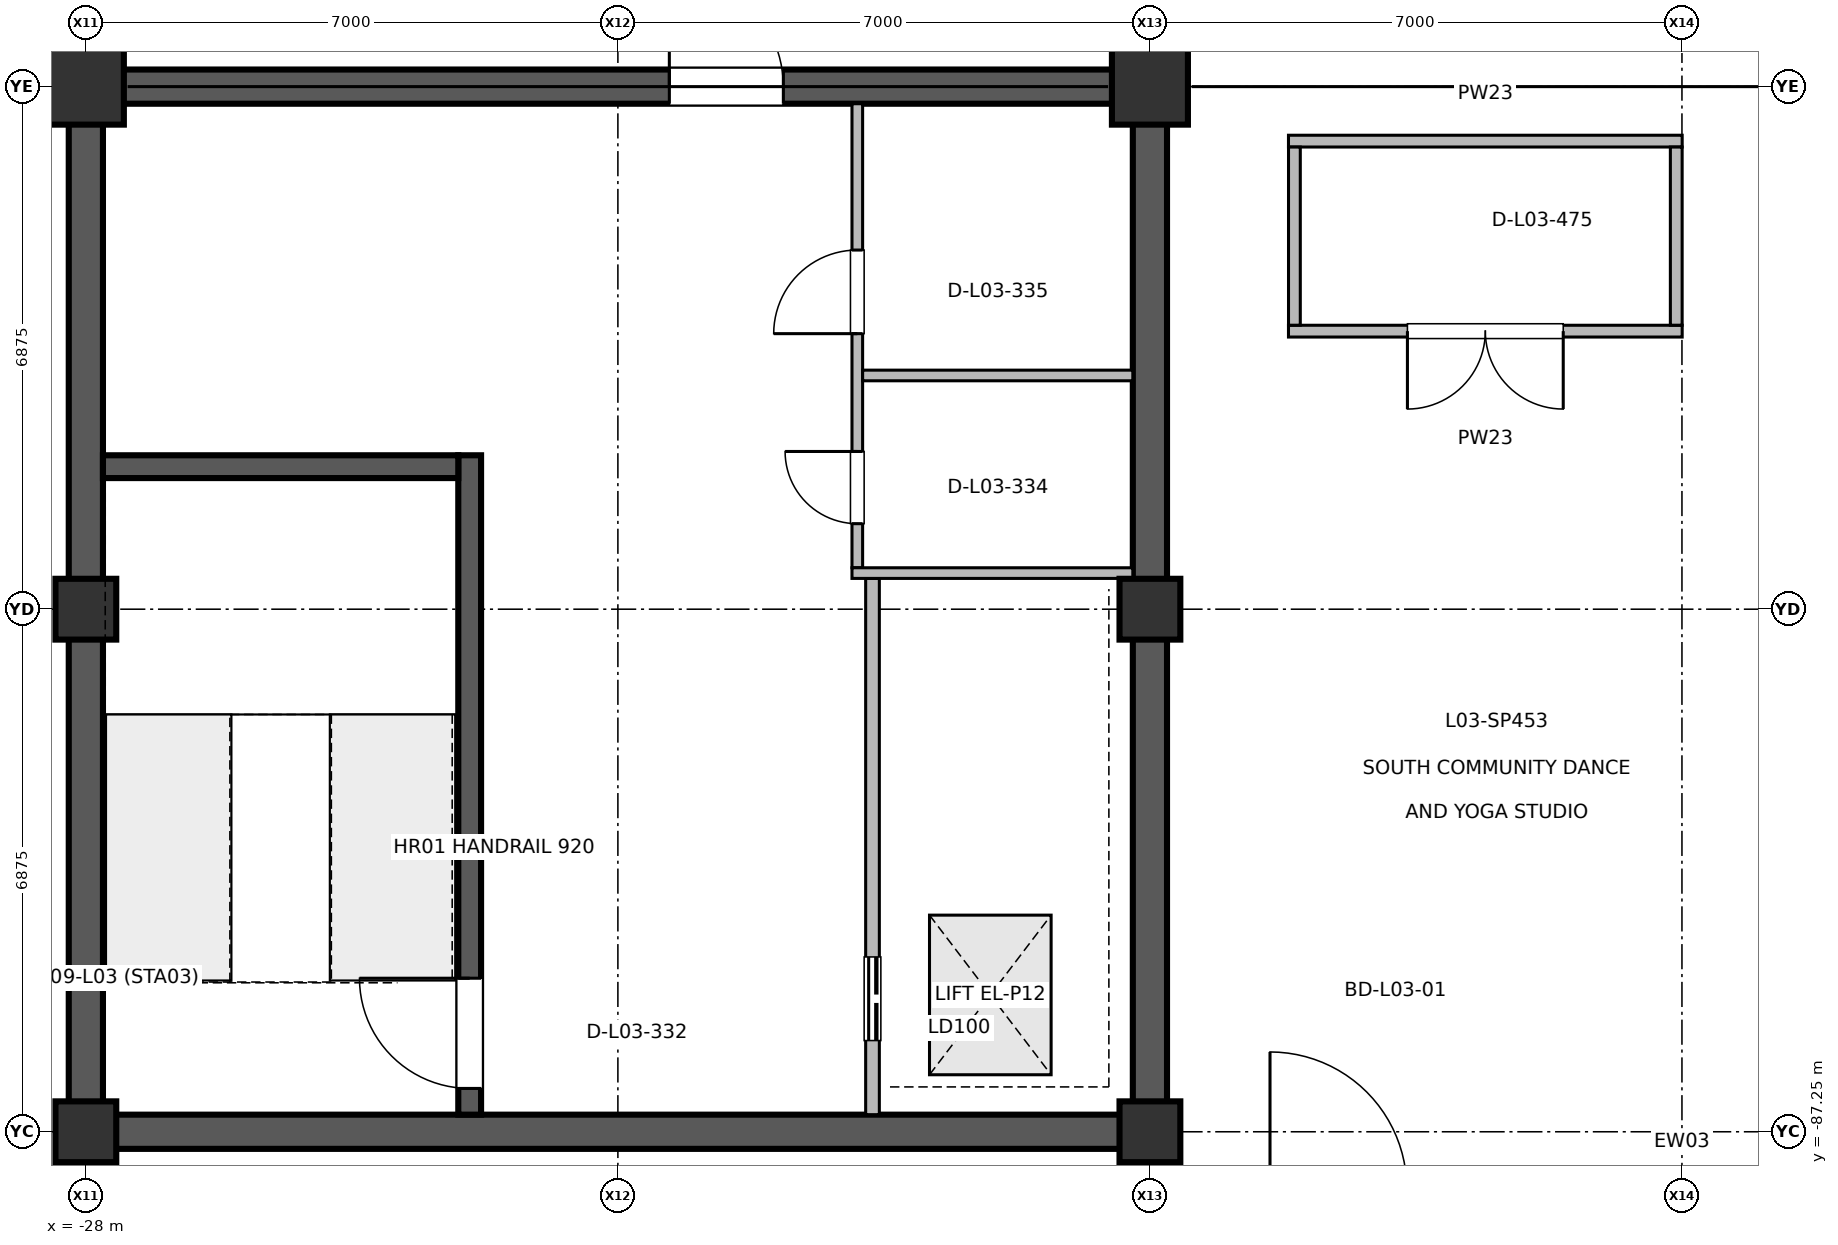
"""IFC4 building model, lengths in metres.
Left out: names, types, materials, properties, quantities, classifications, styles, units other than length and angle.
Written with IfcOpenShell. Run it as: python <this file> out.ifc"""

import sys

from ifc_helpers import new_model, si_unit, direction, frame, frame_2d, origin, origin_2d, place, context, subcontext, project, spatial, rectangle, extrude, element, fill, save


model = new_model("IFC4")
c1 = context("Model", 3, precision=1e-05, world=origin(), true_north=direction((0.0, 1.0)))
c2 = subcontext(c1, "Body", "Model", "MODEL_VIEW")
j1 = project(units=[si_unit("LENGTHUNIT", "METRE"), si_unit("PLANEANGLEUNIT", "RADIAN")], contexts=[c1])
p1 = place(None, origin())
s1 = spatial("IfcSite", under=j1, at=p1, CompositionType="ELEMENT")
p2 = place(p1, origin())
s2 = spatial("IfcBuilding", under=s1, at=p2, CompositionType="ELEMENT")
p3 = place(p2, frame((0.0, 0.0, 11.4)))
s3 = spatial("IfcBuildingStorey", under=s2, at=p3, CompositionType="ELEMENT", Elevation=11.4)
for number, where, z_axis, x_axis in (
    (1, (-28.0, -87.25, 0.0), (0.0, 0.0, 1.0), (1.0, 0.0, 0.0)),
    (2, (-28.0, -80.375, 0.0), (0.0, 0.0, 1.0), (1.0, 0.0, 0.0)),
):
    element("IfcColumn", number, at=place(p3, frame(where, z_axis=z_axis, x_axis=x_axis)), inside=s3, PredefinedType="COLUMN", context=c2, shape_type="SweptSolid", body=[
        extrude(rectangle(XDim=0.8, YDim=0.8, at=origin_2d()), origin(), (0.0, 0.0, 1.0), 4.798),
    ])
p4 = place(p3, frame((-28.0, -73.5, 0.0), z_axis=(0.0, 0.0, 1.0), x_axis=(1.0, 0.0, 0.0)))
e3 = element("IfcColumn", 3, at=p4, inside=s3, PredefinedType="COLUMN", context=c2, shape_type="SweptSolid", body=[
    extrude(rectangle(XDim=1.0, YDim=1.0, at=origin_2d()), origin(), (0.0, 0.0, 1.0), 4.798),
])
for number, where, z_axis, x_axis in (
    (4, (-14.0, -87.25, 0.0), (0.0, 0.0, 1.0), (1.0, 0.0, 0.0)),
    (5, (-14.0, -80.375, 0.0), (0.0, 0.0, 1.0), (1.0, 0.0, 0.0)),
):
    element("IfcColumn", number, at=place(p3, frame(where, z_axis=z_axis, x_axis=x_axis)), inside=s3, PredefinedType="COLUMN", context=c2, shape_type="SweptSolid", body=[
        extrude(rectangle(XDim=0.8, YDim=0.8, at=origin_2d()), origin(), (0.0, 0.0, 1.0), 4.798),
    ])
p5 = place(p3, frame((-14.0, -73.5, 0.0), z_axis=(0.0, 0.0, 1.0), x_axis=(1.0, 0.0, 0.0)))
e6 = element("IfcColumn", 6, at=p5, inside=s3, PredefinedType="COLUMN", context=c2, shape_type="SweptSolid", body=[
    extrude(rectangle(XDim=1.0, YDim=1.0, at=origin_2d()), origin(), (0.0, 0.0, 1.0), 4.798),
])
for number, where, z_axis, x_axis in (
    (7, (-28.0, -87.025, 0.0), (0.0, 0.0, 1.0), (0.0, 1.0, 0.0)),
    (8, (-14.0, -87.025, 0.0), (0.0, 0.0, 1.0), (0.0, 1.0, 0.0)),
):
    element("IfcWall", number, at=place(p3, frame(where, z_axis=z_axis, x_axis=x_axis)), inside=s3, PredefinedType="SHEAR", context=c2, shape_type="SweptSolid", body=[
        extrude(rectangle(XDim=13.3, YDim=0.45, at=frame_2d((6.65, 0.0))), origin(), (0.0, 0.0, 1.0), 4.62),
    ])
p6 = place(p3, frame((-27.775, -87.25, 0.0), z_axis=(0.0, 0.0, 1.0), x_axis=(1.0, 0.0, 0.0)))
e9 = element("IfcWall", 9, at=p6, inside=s3, PredefinedType="SHEAR", context=c2, shape_type="SweptSolid", body=[
    extrude(rectangle(XDim=13.55, YDim=0.45, at=frame_2d((6.775, 0.0))), origin(), (0.0, 0.0, 1.0), 4.62),
])
p7 = place(p3, frame((-27.775, -73.5, 0.0), z_axis=(0.0, 0.0, 1.0), x_axis=(1.0, 0.0, 0.0)))
e10 = element("IfcWall", 10, at=p7, inside=s3, PredefinedType="SHEAR", context=c2, shape_type="SweptSolid", body=[
    extrude(rectangle(XDim=13.55, YDim=0.45, at=frame_2d((6.775, 0.0))), origin(), (0.0, 0.0, 1.0), 4.62),
])
p8 = place(p7, frame((7.452, 0.0, 0.0)))
e11 = element("IfcOpeningElement", 11, at=p8, cuts=e10, PredefinedType="OPENING", context=c2, shape_type="SweptSolid", body=[
    extrude(rectangle(XDim=1.5, YDim=2.2, at=frame_2d((0.75, 1.1))), frame((0.0, 0.235, 0.0), z_axis=(0.0, -1.0, 0.0), x_axis=(1.0, 0.0, 0.0)), (0.0, 0.0, 1.0), 0.47),
])
p9 = place(p3, frame((-22.95, -87.025, 0.0), z_axis=(0.0, 0.0, 1.0), x_axis=(0.0, 1.0, 0.0)))
e12 = element("IfcWall", 12, at=p9, inside=s3, PredefinedType="SHEAR", context=c2, shape_type="SweptSolid", body=[
    extrude(rectangle(XDim=8.675, YDim=0.3, at=frame_2d((4.337, 0.0))), origin(), (0.0, 0.0, 1.0), 4.62),
])
p10 = place(p9, frame((0.345, 0.0, 0.0)))
e13 = element("IfcOpeningElement", 13, at=p10, cuts=e12, PredefinedType="OPENING", context=c2, shape_type="SweptSolid", body=[
    extrude(rectangle(XDim=1.45, YDim=2.2, at=frame_2d((0.725, 1.1))), frame((0.0, 0.16, 0.0), z_axis=(0.0, -1.0, 0.0), x_axis=(1.0, 0.0, 0.0)), (0.0, 0.0, 1.0), 0.32),
])
p11 = place(p3, frame((-17.65, -87.025, 0.0), z_axis=(0.0, 0.0, 1.0), x_axis=(0.0, 1.0, 0.0)))
e14 = element("IfcWall", 14, at=p11, inside=s3, PredefinedType="PARTITIONING", context=c2, shape_type="SweptSolid", body=[
    extrude(rectangle(XDim=7.055, YDim=0.18, at=frame_2d((3.527, 0.0))), origin(), (0.0, 0.0, 1.0), 3.82),
])
p12 = place(p11, frame((0.975, 0.0, 0.0)))
e15 = element("IfcOpeningElement", 15, at=p12, cuts=e14, PredefinedType="OPENING", context=c2, shape_type="SweptSolid", body=[
    extrude(rectangle(XDim=1.1, YDim=2.2, at=frame_2d((0.55, 1.1))), frame((0.0, 0.1, 0.0), z_axis=(0.0, -1.0, 0.0), x_axis=(1.0, 0.0, 0.0)), (0.0, 0.0, 1.0), 0.2),
])
p13 = place(p3, frame((-17.85, -79.83, 0.0), z_axis=(0.0, 0.0, 1.0), x_axis=(0.0, 1.0, 0.0)))
e16 = element("IfcWall", 16, at=p13, inside=s3, PredefinedType="PARTITIONING", context=c2, shape_type="SweptSolid", body=[
    extrude(rectangle(XDim=6.105, YDim=0.14, at=frame_2d((3.052, 0.0))), origin(), (0.0, 0.0, 1.0), 3.82),
])
p14 = place(p13, frame((0.58, 0.0, 0.0)))
e17 = element("IfcOpeningElement", 17, at=p14, cuts=e16, PredefinedType="OPENING", context=c2, shape_type="SweptSolid", body=[
    extrude(rectangle(XDim=0.95, YDim=2.15, at=frame_2d((0.475, 1.075))), frame((0.0, 0.08, 0.0), z_axis=(0.0, -1.0, 0.0), x_axis=(1.0, 0.0, 0.0)), (0.0, 0.0, 1.0), 0.16),
])
p15 = place(p13, frame((3.08, 0.0, 0.0)))
e18 = element("IfcOpeningElement", 18, at=p15, cuts=e16, PredefinedType="OPENING", context=c2, shape_type="SweptSolid", body=[
    extrude(rectangle(XDim=1.1, YDim=2.15, at=frame_2d((0.55, 1.075))), frame((0.0, 0.08, 0.0), z_axis=(0.0, -1.0, 0.0), x_axis=(1.0, 0.0, 0.0)), (0.0, 0.0, 1.0), 0.16),
])
p16 = place(p3, frame((-6.997, -76.717, 0.0), z_axis=(0.0, 0.0, 1.0), x_axis=(-1.0, 0.0, 0.0)))
e19 = element("IfcWall", 19, at=p16, inside=s3, PredefinedType="PARTITIONING", context=c2, shape_type="SweptSolid", body=[
    extrude(rectangle(XDim=5.18, YDim=0.155, at=frame_2d((2.59, 0.0))), origin(), (0.0, 0.0, 1.0), 3.82),
])
p17 = place(p16, frame((1.565, 0.0, 0.0)))
e20 = element("IfcOpeningElement", 20, at=p17, cuts=e19, PredefinedType="OPENING", context=c2, shape_type="SweptSolid", body=[
    extrude(rectangle(XDim=2.05, YDim=2.4, at=frame_2d((1.025, 1.2))), frame((0.0, 0.087, 0.0), z_axis=(0.0, -1.0, 0.0), x_axis=(1.0, 0.0, 0.0)), (0.0, 0.0, 1.0), 0.175),
])
p18 = place(p3, frame((-17.92, -79.9, 0.0), z_axis=(0.0, 0.0, 1.0), x_axis=(1.0, 0.0, 0.0)))
e21 = element("IfcWall", 21, at=p18, inside=s3, PredefinedType="PARTITIONING", context=c2, shape_type="SweptSolid", body=[
    extrude(rectangle(XDim=3.695, YDim=0.14, at=frame_2d((1.847, 0.0))), origin(), (0.0, 0.0, 1.0), 3.82),
])
p19 = place(p3, frame((-17.78, -77.3, 0.0), z_axis=(0.0, 0.0, 1.0), x_axis=(1.0, 0.0, 0.0)))
e22 = element("IfcWall", 22, at=p19, inside=s3, PredefinedType="PARTITIONING", context=c2, shape_type="SweptSolid", body=[
    extrude(rectangle(XDim=3.555, YDim=0.14, at=frame_2d((1.777, 0.0))), origin(), (0.0, 0.0, 1.0), 3.82),
])
p20 = place(p3, frame((-12.177, -74.217, 0.0), z_axis=(0.0, 0.0, 1.0), x_axis=(1.0, 0.0, 0.0)))
e23 = element("IfcWall", 23, at=p20, inside=s3, PredefinedType="PARTITIONING", context=c2, shape_type="SweptSolid", body=[
    extrude(rectangle(XDim=5.18, YDim=0.155, at=frame_2d((2.59, 0.0))), origin(), (0.0, 0.0, 1.0), 3.82),
])
for number, where, z_axis, x_axis in (
    (24, (-12.099, -76.639, 0.0), (0.0, 0.0, 1.0), (0.0, 1.0, 0.0)),
    (25, (-7.075, -76.639, 0.0), (0.0, 0.0, 1.0), (0.0, 1.0, 0.0)),
):
    element("IfcWall", number, at=place(p3, frame(where, z_axis=z_axis, x_axis=x_axis)), inside=s3, PredefinedType="PARTITIONING", context=c2, shape_type="SweptSolid", body=[
        extrude(rectangle(XDim=2.344, YDim=0.155, at=frame_2d((1.172, 0.0))), origin(), (0.0, 0.0, 1.0), 3.82),
    ])
p21 = place(p3, frame((-27.775, -78.5, 0.0), z_axis=(0.0, 0.0, 1.0), x_axis=(1.0, 0.0, 0.0)))
e26 = element("IfcWall", 26, at=p21, inside=s3, PredefinedType="SHEAR", context=c2, shape_type="SweptSolid", body=[
    extrude(rectangle(XDim=4.675, YDim=0.3, at=frame_2d((2.337, 0.0))), origin(), (0.0, 0.0, 1.0), 4.62),
])
p22 = place(p8, origin())
e27 = element("IfcDoor", 27, at=p22, inside=s3, OperationType="SINGLE_SWING_LEFT", PredefinedType="DOOR", context=c2, shape_type="SweptSolid", body=[
    extrude(rectangle(XDim=1.5, YDim=2.2, at=frame_2d((0.75, 1.1))), frame((0.0, 0.025, 0.0), z_axis=(0.0, -1.0, 0.0), x_axis=(1.0, 0.0, 0.0)), (0.0, 0.0, 1.0), 0.05),
])
fill(e11, e27)
p23 = place(p10, origin())
e28 = element("IfcDoor", 28, at=p23, inside=s3, OperationType="SINGLE_SWING_RIGHT", PredefinedType="DOOR", context=c2, shape_type="SweptSolid", body=[
    extrude(rectangle(XDim=1.45, YDim=2.2, at=frame_2d((0.725, 1.1))), frame((0.0, 0.025, 0.0), z_axis=(0.0, -1.0, 0.0), x_axis=(1.0, 0.0, 0.0)), (0.0, 0.0, 1.0), 0.05),
])
fill(e13, e28)
p24 = place(p12, origin())
e29 = element("IfcDoor", 29, at=p24, inside=s3, OperationType="DOUBLE_DOOR_SLIDING", PredefinedType="DOOR", context=c2, shape_type="SweptSolid", body=[
    extrude(rectangle(XDim=1.1, YDim=2.2, at=frame_2d((0.55, 1.1))), frame((0.0, 0.025, 0.0), z_axis=(0.0, -1.0, 0.0), x_axis=(1.0, 0.0, 0.0)), (0.0, 0.0, 1.0), 0.05),
])
fill(e15, e29)
p25 = place(p14, origin())
e30 = element("IfcDoor", 30, at=p25, inside=s3, OperationType="SINGLE_SWING_RIGHT", PredefinedType="DOOR", context=c2, shape_type="SweptSolid", body=[
    extrude(rectangle(XDim=0.95, YDim=2.15, at=frame_2d((0.475, 1.075))), frame((0.0, 0.025, 0.0), z_axis=(0.0, -1.0, 0.0), x_axis=(1.0, 0.0, 0.0)), (0.0, 0.0, 1.0), 0.05),
])
fill(e17, e30)
p26 = place(p15, origin())
e31 = element("IfcDoor", 31, at=p26, inside=s3, OperationType="SINGLE_SWING_LEFT", PredefinedType="DOOR", context=c2, shape_type="SweptSolid", body=[
    extrude(rectangle(XDim=1.1, YDim=2.15, at=frame_2d((0.55, 1.075))), frame((0.0, 0.025, 0.0), z_axis=(0.0, -1.0, 0.0), x_axis=(1.0, 0.0, 0.0)), (0.0, 0.0, 1.0), 0.05),
])
fill(e18, e31)
p27 = place(p17, origin())
e32 = element("IfcDoor", 32, at=p27, inside=s3, OperationType="DOUBLE_DOOR_SINGLE_SWING", PredefinedType="DOOR", context=c2, shape_type="SweptSolid", body=[
    extrude(rectangle(XDim=2.05, YDim=2.4, at=frame_2d((1.025, 1.2))), frame((0.0, 0.025, 0.0), z_axis=(0.0, -1.0, 0.0), x_axis=(1.0, 0.0, 0.0)), (0.0, 0.0, 1.0), 0.05),
])
fill(e20, e32)
save(model, sys.argv[1])
